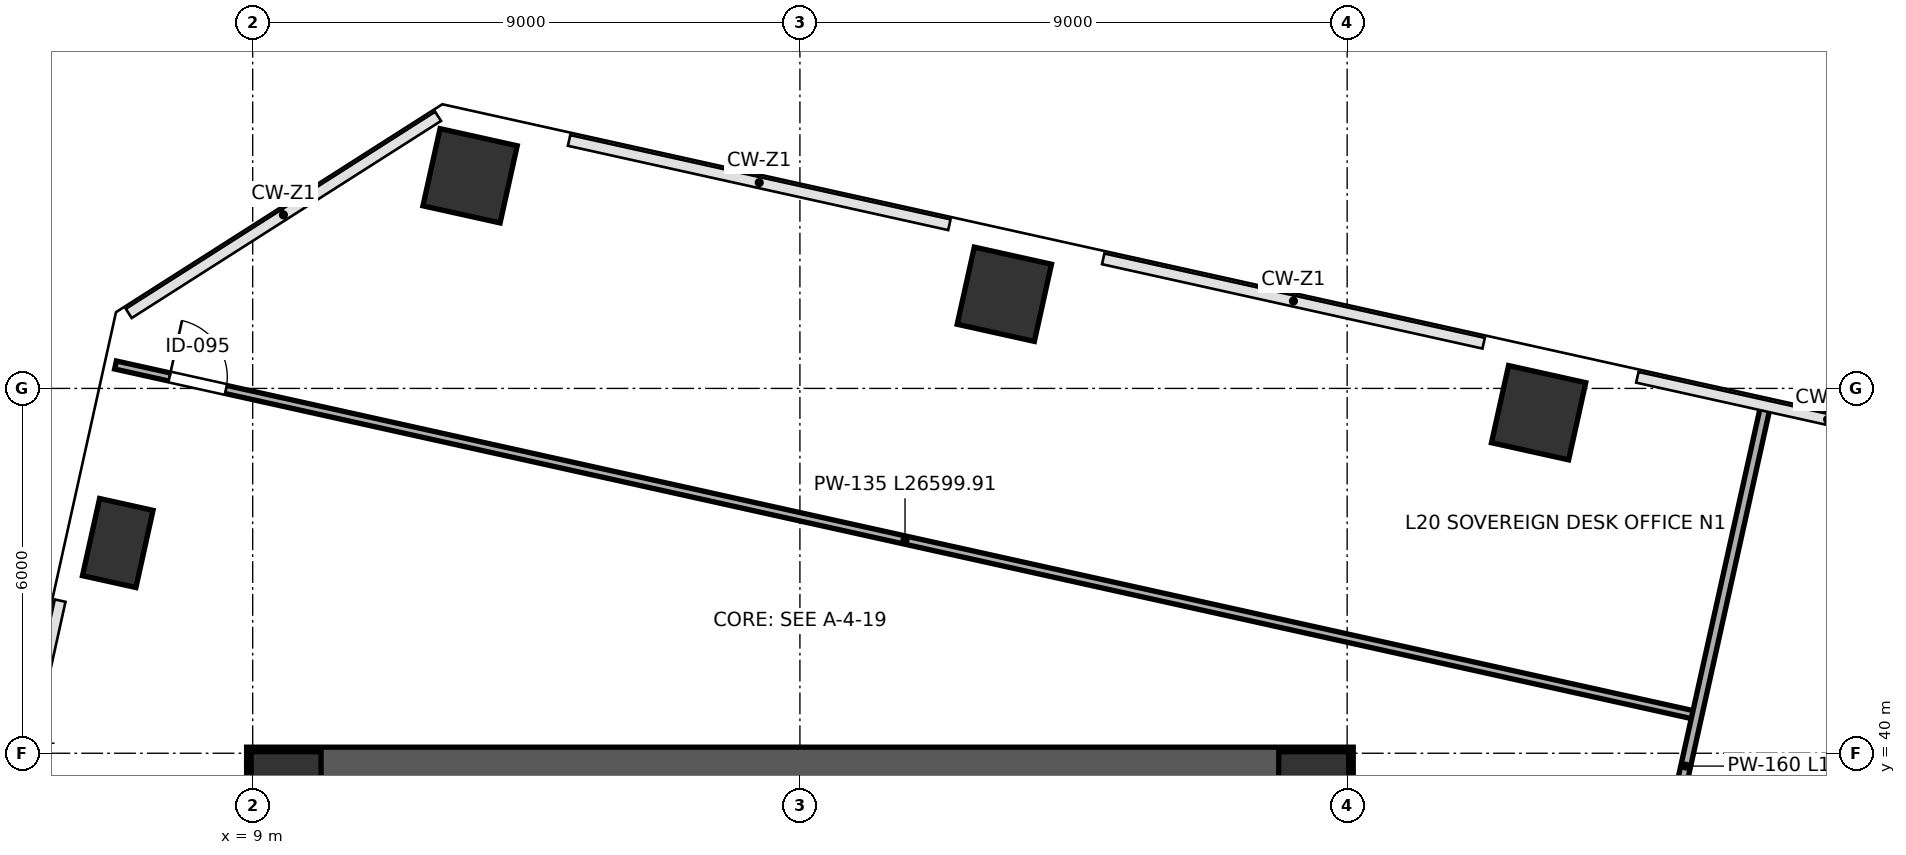
"""IFC4 building model, lengths in metres.
Left out: names, types, materials, properties, quantities, classifications, styles, units other than length and angle.
Written with IfcOpenShell. Run it as: python <this file> out.ifc"""

import sys

from ifc_helpers import new_model, si_unit, direction, frame, frame_2d, origin, origin_2d, place, context, subcontext, project, spatial, rectangle, extrude, clip, halfspace, source, transform, mapped, element, fill, save


model = new_model("IFC4")
c1 = context("Model", 3, precision=1e-05, world=origin(), true_north=direction((0.0, 1.0)))
c2 = subcontext(c1, "Body", "Model", "MODEL_VIEW")
j1 = project(units=[si_unit("LENGTHUNIT", "METRE"), si_unit("PLANEANGLEUNIT", "RADIAN")], contexts=[c1])
p1 = place(None, origin())
s1 = spatial("IfcSite", under=j1, at=p1, CompositionType="ELEMENT")
p2 = place(p1, origin())
s2 = spatial("IfcBuilding", under=s1, at=p2, CompositionType="ELEMENT")
p3 = place(p2, frame((0.0, 0.0, 91.6)))
s3 = spatial("IfcBuildingStorey", under=s2, at=p3, CompositionType="ELEMENT", Elevation=91.6)
m1 = source(origin(), c2, "Body", "SweptSolid", [
    extrude(rectangle(XDim=1.15, YDim=1.15, at=origin_2d()), origin(), (0.0, 0.0, 1.0), 4.198),
])
for number, where, z_axis, x_axis in (
    (1, (9.55, 39.45, 0.001), (0.0, 0.0, 1.0), (1.0, 0.0, 0.0)),
    (2, (26.45, 39.45, 0.001), (0.0, 0.0, 1.0), (1.0, 0.0, 0.0)),
):
    element("IfcColumn", number, at=place(p3, frame(where, z_axis=z_axis, x_axis=x_axis)), inside=s3, PredefinedType="COLUMN", context=c2, shape_type="MappedRepresentation", body=[
        mapped(m1, transform((0.0, 0.0, 0.0), scale=1.0)),
    ])
p4 = place(p3, frame((12.575, 49.496, 0.0), z_axis=(0.090907405108, 0.045164556863, 0.994834662896), x_axis=(0.241552426819, -0.970139022574, 0.021970479665)))
e3 = element("IfcColumn", 3, at=p4, inside=s3, PredefinedType="COLUMN", context=c2, shape_type="Clipping", body=[
    clip(clip(extrude(rectangle(XDim=1.3, YDim=1.3, at=origin_2d()), origin(), (0.0, 0.0, 1.0), 4.222), halfspace(frame((0.0, 0.0, 0.08), z_axis=(0.0, 0.0, -1.0), x_axis=(1.0, 0.0, 0.0)), False)), halfspace(frame((0.0, 0.0, 4.142), z_axis=(0.0, 0.0, 1.0), x_axis=(1.0, 0.0, 0.0)), False)),
])
p5 = place(p3, frame((21.362, 47.548, 0.0), z_axis=(0.080479822915, -0.000173822512, 0.9967562229), x_axis=(-0.217845654651, -0.975827775283, 0.01741906243)))
e4 = element("IfcColumn", 4, at=p5, inside=s3, PredefinedType="COLUMN", context=c2, shape_type="Clipping", body=[
    clip(clip(extrude(rectangle(XDim=1.3, YDim=1.3, at=origin_2d()), origin(), (0.0, 0.0, 1.0), 4.214), halfspace(frame((0.0, 0.0, 0.063), z_axis=(0.0, 0.0, -1.0), x_axis=(1.0, 0.0, 0.0)), False)), halfspace(frame((0.0, 0.0, 4.15), z_axis=(0.0, 0.0, 1.0), x_axis=(1.0, 0.0, 0.0)), False)),
])
p6 = place(p3, frame((30.149, 45.601, 0.0), z_axis=(0.069917538231, -0.045530393579, 0.996513181603), x_axis=(-0.713501049168, -0.700421397913, 0.018058742521)))
e5 = element("IfcColumn", 5, at=p6, inside=s3, PredefinedType="COLUMN", context=c2, shape_type="Clipping", body=[
    clip(clip(extrude(rectangle(XDim=1.3, YDim=1.3, at=origin_2d()), origin(), (0.0, 0.0, 1.0), 4.215), halfspace(frame((0.0, 0.0, 0.066), z_axis=(0.0, 0.0, -1.0), x_axis=(1.0, 0.0, 0.0)), False)), halfspace(frame((0.0, 0.0, 4.149), z_axis=(0.0, 0.0, 1.0), x_axis=(1.0, 0.0, 0.0)), False)),
])
p7 = place(p3, frame((6.781, 43.458, 0.0), z_axis=(0.060057371568, 0.075389937526, 0.995343895063), x_axis=(0.629383357778, -0.776814883848, 0.020862051286)))
e6 = element("IfcColumn", 6, at=p7, inside=s3, PredefinedType="PILASTER", context=c2, shape_type="Clipping", body=[
    clip(clip(extrude(rectangle(XDim=0.9, YDim=1.3, at=origin_2d()), origin(), (0.0, 0.0, 1.0), 4.219), halfspace(frame((0.0, 0.0, 0.072), z_axis=(0.0, 0.0, -1.0), x_axis=(1.0, 0.0, 0.0)), False)), halfspace(frame((0.0, 0.0, 4.148), z_axis=(0.0, 0.0, 1.0), x_axis=(1.0, 0.0, 0.0)), False)),
])
p8 = place(p3, frame((8.9, 39.825, 0.0), z_axis=(0.0, 0.0, 1.0), x_axis=(1.0, 0.0, 0.0)))
e7 = element("IfcWall", 7, at=p8, inside=s3, PredefinedType="SHEAR", context=c2, shape_type="SweptSolid", body=[
    extrude(rectangle(XDim=18.2, YDim=0.55, at=frame_2d((9.1, 0.0))), origin(), (0.0, 0.0, 1.0), 3.96),
])
p9 = place(p3, frame((6.744, 46.385, 0.0), z_axis=(0.0, 0.0, 1.0), x_axis=(0.976297719541, -0.216431889561, 0.0)))
e8 = element("IfcWall", 8, at=p9, inside=s3, PredefinedType="PARTITIONING", context=c2, shape_type="SweptSolid", body=[
    extrude(rectangle(XDim=26.6, YDim=0.135, at=frame_2d((13.3, 0.0))), origin(), (0.0, 0.0, 1.0), 3.96),
])
p10 = place(p9, frame((0.91, 0.0, 0.0)))
e9 = element("IfcOpeningElement", 9, at=p10, cuts=e8, PredefinedType="OPENING", context=c2, shape_type="SweptSolid", body=[
    extrude(rectangle(XDim=0.95, YDim=2.15, at=frame_2d((0.475, 1.075))), frame((0.0, 0.078, 0.0), z_axis=(0.0, -1.0, 0.0), x_axis=(1.0, 0.0, 0.0)), (0.0, 0.0, 1.0), 0.155),
])
p11 = place(p3, frame((31.265, 33.912, 0.0), z_axis=(0.0, 0.0, 1.0), x_axis=(0.216425867349, 0.976299054564, 0.0)))
e10 = element("IfcWall", 10, at=p11, inside=s3, PredefinedType="PARTITIONING", context=c2, shape_type="SweptSolid", body=[
    extrude(rectangle(XDim=12.04, YDim=0.16, at=frame_2d((6.02, 0.0))), origin(), (0.0, 0.0, 1.0), 3.095),
])
m2 = source(origin(), c2, "Body", "SweptSolid", [
    extrude(rectangle(XDim=0.95, YDim=2.15, at=frame_2d((0.475, 1.075))), frame((0.0, 0.025, 0.0), z_axis=(0.0, -1.0, 0.0), x_axis=(1.0, 0.0, 0.0)), (0.0, 0.0, 1.0), 0.05),
])
p12 = place(p10, origin())
e11 = element("IfcDoor", 11, at=p12, inside=s3, OperationType="SINGLE_SWING_LEFT", PredefinedType="DOOR", context=c2, shape_type="MappedRepresentation", body=[
    mapped(m2, transform((0.0, 0.0, 0.0), scale=1.0)),
])
fill(e9, e11)
save(model, sys.argv[1])
